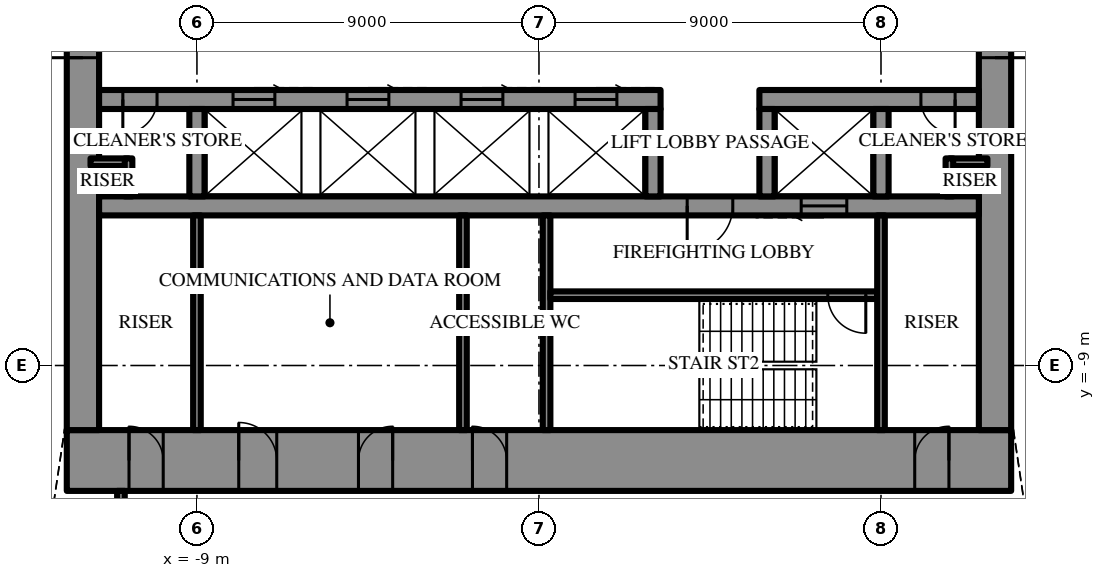
"""IFC4 building model, lengths in metres.
Left out: names, types, materials, properties, quantities, classifications, styles, units other than length and angle.
Written with IfcOpenShell. Run it as: python <this file> out.ifc"""

import sys

from ifc_helpers import new_model, si_unit, direction, frame, frame_2d, origin, place, context, subcontext, project, spatial, rectangle, extrude, element, fill, save


model = new_model("IFC4")
c1 = context("Model", 3, precision=1e-05, world=origin(), true_north=direction((0.0, 1.0)))
c2 = subcontext(c1, "Body", "Model", "MODEL_VIEW")
j1 = project(units=[si_unit("LENGTHUNIT", "METRE"), si_unit("PLANEANGLEUNIT", "RADIAN")], contexts=[c1])
p1 = place(None, origin())
s1 = spatial("IfcSite", under=j1, at=p1, CompositionType="ELEMENT")
p2 = place(p1, origin())
s2 = spatial("IfcBuilding", under=s1, at=p2, CompositionType="ELEMENT")
p3 = place(p2, frame((0.0, 0.0, 324.1)))
s3 = spatial("IfcBuildingStorey", under=s2, at=p3, CompositionType="ELEMENT", Elevation=324.1)
p4 = place(p3, frame((12.425, -11.5, 0.0), z_axis=(0.0, 0.0, 1.0), x_axis=(-1.0, 0.0, 0.0)))
e1 = element("IfcWall", 1, at=p4, inside=s3, PredefinedType="SHEAR", context=c2, shape_type="SweptSolid", body=[
    extrude(rectangle(XDim=24.85, YDim=1.6, at=frame_2d((12.425, 0.0))), origin(), (0.0, 0.0, 1.0), 4.2),
])
p5 = place(p4, frame((13.275, 0.0, 0.0)))
e2 = element("IfcOpeningElement", 2, at=p5, cuts=e1, PredefinedType="OPENING", context=c2, shape_type="SweptSolid", body=[
    extrude(rectangle(XDim=0.9, YDim=2.2, at=frame_2d((0.45, 1.1))), frame((0.0, 0.81, 0.0), z_axis=(0.0, -1.0, 0.0), x_axis=(1.0, 0.0, 0.0)), (0.0, 0.0, 1.0), 1.62),
])
p6 = place(p4, frame((16.275, 0.0, 0.0)))
e3 = element("IfcOpeningElement", 3, at=p6, cuts=e1, PredefinedType="OPENING", context=c2, shape_type="SweptSolid", body=[
    extrude(rectangle(XDim=0.9, YDim=2.2, at=frame_2d((0.45, 1.1))), frame((0.0, 0.81, 0.0), z_axis=(0.0, -1.0, 0.0), x_axis=(1.0, 0.0, 0.0)), (0.0, 0.0, 1.0), 1.62),
])
p7 = place(p4, frame((19.325, 0.0, 0.0)))
e4 = element("IfcOpeningElement", 4, at=p7, cuts=e1, PredefinedType="OPENING", context=c2, shape_type="SweptSolid", body=[
    extrude(rectangle(XDim=1.0, YDim=2.2, at=frame_2d((0.5, 1.1))), frame((0.0, 0.81, 0.0), z_axis=(0.0, -1.0, 0.0), x_axis=(1.0, 0.0, 0.0)), (0.0, 0.0, 1.0), 1.62),
])
p8 = place(p4, frame((1.637, 0.0, 0.0)))
e5 = element("IfcOpeningElement", 5, at=p8, cuts=e1, PredefinedType="OPENING", context=c2, shape_type="SweptSolid", body=[
    extrude(rectangle(XDim=0.9, YDim=2.2, at=frame_2d((0.45, 1.1))), frame((0.0, 0.81, 0.0), z_axis=(0.0, -1.0, 0.0), x_axis=(1.0, 0.0, 0.0)), (0.0, 0.0, 1.0), 1.62),
])
p9 = place(p4, frame((22.312, 0.0, 0.0)))
e6 = element("IfcOpeningElement", 6, at=p9, cuts=e1, PredefinedType="OPENING", context=c2, shape_type="SweptSolid", body=[
    extrude(rectangle(XDim=0.9, YDim=2.2, at=frame_2d((0.45, 1.1))), frame((0.0, 0.81, 0.0), z_axis=(0.0, -1.0, 0.0), x_axis=(1.0, 0.0, 0.0)), (0.0, 0.0, 1.0), 1.62),
])
p10 = place(p3, frame((12.0, -10.7, 0.0), z_axis=(0.0, 0.0, 1.0), x_axis=(0.0, 1.0, 0.0)))
e7 = element("IfcWall", 7, at=p10, inside=s3, PredefinedType="SHEAR", context=c2, shape_type="SweptSolid", body=[
    extrude(rectangle(XDim=21.4, YDim=0.85, at=frame_2d((10.7, 0.0))), origin(), (0.0, 0.0, 1.0), 4.2),
])
p11 = place(p10, frame((9.8, 0.0, 0.0)))
e8 = element("IfcOpeningElement", 8, at=p11, cuts=e7, PredefinedType="OPENING", context=c2, shape_type="SweptSolid", body=[
    extrude(rectangle(XDim=1.8, YDim=2.4, at=frame_2d((0.9, 1.2))), frame((0.0, 0.435, 0.0), z_axis=(0.0, -1.0, 0.0), x_axis=(1.0, 0.0, 0.0)), (0.0, 0.0, 1.0), 0.87),
])
p12 = place(p3, frame((-12.0, 10.7, 0.0), z_axis=(0.0, 0.0, 1.0), x_axis=(0.0, -1.0, 0.0)))
e9 = element("IfcWall", 9, at=p12, inside=s3, PredefinedType="SHEAR", context=c2, shape_type="SweptSolid", body=[
    extrude(rectangle(XDim=21.4, YDim=0.85, at=frame_2d((10.7, 0.0))), origin(), (0.0, 0.0, 1.0), 4.2),
])
p13 = place(p12, frame((9.8, 0.0, 0.0)))
e10 = element("IfcOpeningElement", 10, at=p13, cuts=e9, PredefinedType="OPENING", context=c2, shape_type="SweptSolid", body=[
    extrude(rectangle(XDim=1.8, YDim=2.4, at=frame_2d((0.9, 1.2))), frame((0.0, 0.435, 0.0), z_axis=(0.0, -1.0, 0.0), x_axis=(1.0, 0.0, 0.0)), (0.0, 0.0, 1.0), 0.87),
])
p14 = place(p3, frame((11.575, -2.0, 0.0), z_axis=(0.0, 0.0, 1.0), x_axis=(-1.0, 0.0, 0.0)))
e11 = element("IfcWall", 11, at=p14, inside=s3, PredefinedType="SHEAR", context=c2, shape_type="SweptSolid", body=[
    extrude(rectangle(XDim=5.775, YDim=0.5, at=frame_2d((2.887, 0.0))), origin(), (0.0, 0.0, 1.0), 4.2),
])
p15 = place(p14, frame((0.625, 0.0, 0.0)))
e12 = element("IfcOpeningElement", 12, at=p15, cuts=e11, PredefinedType="OPENING", context=c2, shape_type="SweptSolid", body=[
    extrude(rectangle(XDim=0.9, YDim=2.2, at=frame_2d((0.45, 1.1))), frame((0.0, 0.26, 0.0), z_axis=(0.0, -1.0, 0.0), x_axis=(1.0, 0.0, 0.0)), (0.0, 0.0, 1.0), 0.52),
])
p16 = place(p3, frame((3.2, -2.0, 0.0), z_axis=(0.0, 0.0, 1.0), x_axis=(-1.0, 0.0, 0.0)))
e13 = element("IfcWall", 13, at=p16, inside=s3, PredefinedType="SHEAR", context=c2, shape_type="SweptSolid", body=[
    extrude(rectangle(XDim=14.775, YDim=0.5, at=frame_2d((7.387, 0.0))), origin(), (0.0, 0.0, 1.0), 4.2),
])
p17 = place(p16, frame((13.25, 0.0, 0.0)))
e14 = element("IfcOpeningElement", 14, at=p17, cuts=e13, PredefinedType="OPENING", context=c2, shape_type="SweptSolid", body=[
    extrude(rectangle(XDim=0.9, YDim=2.2, at=frame_2d((0.45, 1.1))), frame((0.0, 0.26, 0.0), z_axis=(0.0, -1.0, 0.0), x_axis=(1.0, 0.0, 0.0)), (0.0, 0.0, 1.0), 0.52),
])
p18 = place(p16, frame((1.15, 0.0, 0.0)))
e15 = element("IfcOpeningElement", 15, at=p18, cuts=e13, PredefinedType="OPENING", context=c2, shape_type="SweptSolid", body=[
    extrude(rectangle(XDim=1.1, YDim=2.2, at=frame_2d((0.55, 1.1))), frame((0.0, 0.26, 0.0), z_axis=(0.0, -1.0, 0.0), x_axis=(1.0, 0.0, 0.0)), (0.0, 0.0, 1.0), 0.52),
])
p19 = place(p16, frame((4.15, 0.0, 0.0)))
e16 = element("IfcOpeningElement", 16, at=p19, cuts=e13, PredefinedType="OPENING", context=c2, shape_type="SweptSolid", body=[
    extrude(rectangle(XDim=1.1, YDim=2.2, at=frame_2d((0.55, 1.1))), frame((0.0, 0.26, 0.0), z_axis=(0.0, -1.0, 0.0), x_axis=(1.0, 0.0, 0.0)), (0.0, 0.0, 1.0), 0.52),
])
p20 = place(p16, frame((7.15, 0.0, 0.0)))
e17 = element("IfcOpeningElement", 17, at=p20, cuts=e13, PredefinedType="OPENING", context=c2, shape_type="SweptSolid", body=[
    extrude(rectangle(XDim=1.1, YDim=2.2, at=frame_2d((0.55, 1.1))), frame((0.0, 0.26, 0.0), z_axis=(0.0, -1.0, 0.0), x_axis=(1.0, 0.0, 0.0)), (0.0, 0.0, 1.0), 0.52),
])
p21 = place(p16, frame((10.15, 0.0, 0.0)))
e18 = element("IfcOpeningElement", 18, at=p21, cuts=e13, PredefinedType="OPENING", context=c2, shape_type="SweptSolid", body=[
    extrude(rectangle(XDim=1.1, YDim=2.2, at=frame_2d((0.55, 1.1))), frame((0.0, 0.26, 0.0), z_axis=(0.0, -1.0, 0.0), x_axis=(1.0, 0.0, 0.0)), (0.0, 0.0, 1.0), 0.52),
])
p22 = place(p3, frame((11.575, -4.8, 0.0), z_axis=(0.0, 0.0, 1.0), x_axis=(-1.0, 0.0, 0.0)))
e19 = element("IfcWall", 19, at=p22, inside=s3, PredefinedType="SHEAR", context=c2, shape_type="SweptSolid", body=[
    extrude(rectangle(XDim=23.15, YDim=0.5, at=frame_2d((11.575, 0.0))), origin(), (0.0, 0.0, 1.0), 4.2),
])
p23 = place(p22, frame((6.475, 0.0, 0.0)))
e20 = element("IfcOpeningElement", 20, at=p23, cuts=e19, PredefinedType="OPENING", context=c2, shape_type="SweptSolid", body=[
    extrude(rectangle(XDim=1.2, YDim=2.2, at=frame_2d((0.6, 1.1))), frame((0.0, 0.26, 0.0), z_axis=(0.0, -1.0, 0.0), x_axis=(1.0, 0.0, 0.0)), (0.0, 0.0, 1.0), 0.52),
])
p24 = place(p22, frame((3.475, 0.0, 0.0)))
e21 = element("IfcOpeningElement", 21, at=p24, cuts=e19, PredefinedType="OPENING", context=c2, shape_type="SweptSolid", body=[
    extrude(rectangle(XDim=1.2, YDim=2.2, at=frame_2d((0.6, 1.1))), frame((0.0, 0.26, 0.0), z_axis=(0.0, -1.0, 0.0), x_axis=(1.0, 0.0, 0.0)), (0.0, 0.0, 1.0), 0.52),
])
for number, where, z_axis, x_axis in (
    (22, (9.0, -2.25, 0.0), (0.0, 0.0, 1.0), (0.0, -1.0, 0.0)),
    (23, (6.0, -2.25, 0.0), (0.0, 0.0, 1.0), (0.0, -1.0, 0.0)),
    (24, (3.0, -2.25, 0.0), (0.0, 0.0, 1.0), (0.0, -1.0, 0.0)),
    (25, (-9.0, -2.25, 0.0), (0.0, 0.0, 1.0), (0.0, -1.0, 0.0)),
):
    element("IfcWall", number, at=place(p3, frame(where, z_axis=z_axis, x_axis=x_axis)), inside=s3, PredefinedType="SHEAR", context=c2, shape_type="SweptSolid", body=[
        extrude(rectangle(XDim=2.3, YDim=0.4, at=frame_2d((1.15, 0.0))), origin(), (0.0, 0.0, 1.0), 4.2),
    ])
p25 = place(p3, frame((0.2, -5.05, 0.0), z_axis=(0.0, 0.0, 1.0), x_axis=(0.0, -1.0, 0.0)))
e26 = element("IfcWall", 26, at=p25, inside=s3, PredefinedType="SHEAR", context=c2, shape_type="SweptSolid", body=[
    extrude(rectangle(XDim=5.65, YDim=0.2, at=frame_2d((2.825, 0.0))), origin(), (0.0, 0.0, 1.0), 4.2),
])
p26 = place(p3, frame((8.9, -7.15, 0.0), z_axis=(0.0, 0.0, 1.0), x_axis=(-1.0, 0.0, 0.0)))
e27 = element("IfcWall", 27, at=p26, inside=s3, PredefinedType="SHEAR", context=c2, shape_type="SweptSolid", body=[
    extrude(rectangle(XDim=8.6, YDim=0.2, at=frame_2d((4.3, 0.0))), origin(), (0.0, 0.0, 1.0), 4.2),
])
p27 = place(p26, frame((0.3, 0.0, 0.0)))
e28 = element("IfcOpeningElement", 28, at=p27, cuts=e27, PredefinedType="OPENING", context=c2, shape_type="SweptSolid", body=[
    extrude(rectangle(XDim=1.0, YDim=2.2, at=frame_2d((0.5, 1.1))), frame((0.0, 0.11, 0.0), z_axis=(0.0, -1.0, 0.0), x_axis=(1.0, 0.0, 0.0)), (0.0, 0.0, 1.0), 0.22),
])
for number, where, z_axis, x_axis in (
    (29, (9.0, -5.05, 0.0), (0.0, 0.0, 1.0), (0.0, -1.0, 0.0)),
    (30, (-9.0, -5.05, 0.0), (0.0, 0.0, 1.0), (0.0, -1.0, 0.0)),
    (31, (-2.0, -5.05, 0.0), (0.0, 0.0, 1.0), (0.0, -1.0, 0.0)),
):
    element("IfcWall", number, at=place(p3, frame(where, z_axis=z_axis, x_axis=x_axis)), inside=s3, PredefinedType="PARTITIONING", context=c2, shape_type="SweptSolid", body=[
        extrude(rectangle(XDim=5.65, YDim=0.2, at=frame_2d((2.825, 0.0))), origin(), (0.0, 0.0, 1.0), 4.0),
    ])
for number, where, z_axis, x_axis in (
    (32, (11.8, -3.65, 0.0), (0.0, 0.0, 1.0), (-1.0, 0.0, 0.0)),
    (33, (10.8, -3.55, 0.0), (0.0, 0.0, 1.0), (0.0, -1.0, 0.0)),
    (34, (-10.8, -3.65, 0.0), (0.0, 0.0, 1.0), (-1.0, 0.0, 0.0)),
    (35, (-10.8, -3.55, 0.0), (0.0, 0.0, 1.0), (0.0, -1.0, 0.0)),
):
    element("IfcWall", number, at=place(p3, frame(where, z_axis=z_axis, x_axis=x_axis)), inside=s3, PredefinedType="PARTITIONING", context=c2, shape_type="SweptSolid", body=[
        extrude(rectangle(XDim=1.0, YDim=0.2, at=frame_2d((0.5, 0.0))), origin(), (0.0, 0.0, 1.0), 4.0),
    ])
p28 = place(p3, frame((-11.0, -12.3, 0.0), z_axis=(0.0, 0.0, 1.0), x_axis=(0.0, -1.0, 0.0)))
e36 = element("IfcWall", 36, at=p28, inside=s3, PredefinedType="PARTITIONING", context=c2, shape_type="SweptSolid", body=[
    extrude(rectangle(XDim=14.25, YDim=0.2, at=frame_2d((7.125, 0.0))), origin(), (0.0, 0.0, 1.0), 4.0),
])
p29 = place(p28, frame((0.925, 0.0, 0.0)))
e37 = element("IfcOpeningElement", 37, at=p29, cuts=e36, PredefinedType="OPENING", context=c2, shape_type="SweptSolid", body=[
    extrude(rectangle(XDim=1.0, YDim=2.2, at=frame_2d((0.5, 1.1))), frame((0.0, 0.11, 0.0), z_axis=(0.0, -1.0, 0.0), x_axis=(1.0, 0.0, 0.0)), (0.0, 0.0, 1.0), 0.22),
])
p30 = place(p11, frame((1.8, 0.0, 0.0), z_axis=(0.0, 0.0, 1.0), x_axis=(-1.0, 0.0, 0.0)))
e38 = element("IfcDoor", 38, at=p30, inside=s3, OperationType="DOUBLE_DOOR_SINGLE_SWING", PredefinedType="DOOR", context=c2, shape_type="SweptSolid", body=[
    extrude(rectangle(XDim=1.8, YDim=2.4, at=frame_2d((0.9, 1.2))), frame((0.0, 0.025, 0.0), z_axis=(0.0, -1.0, 0.0), x_axis=(1.0, 0.0, 0.0)), (0.0, 0.0, 1.0), 0.05),
])
fill(e8, e38)
p31 = place(p13, frame((1.8, 0.0, 0.0), z_axis=(0.0, 0.0, 1.0), x_axis=(-1.0, 0.0, 0.0)))
e39 = element("IfcDoor", 39, at=p31, inside=s3, OperationType="DOUBLE_DOOR_SINGLE_SWING", PredefinedType="DOOR", context=c2, shape_type="SweptSolid", body=[
    extrude(rectangle(XDim=1.8, YDim=2.4, at=frame_2d((0.9, 1.2))), frame((0.0, 0.025, 0.0), z_axis=(0.0, -1.0, 0.0), x_axis=(1.0, 0.0, 0.0)), (0.0, 0.0, 1.0), 0.05),
])
fill(e10, e39)
p32 = place(p23, origin())
e40 = element("IfcDoor", 40, at=p32, inside=s3, OperationType="SINGLE_SWING_LEFT", PredefinedType="DOOR", context=c2, shape_type="SweptSolid", body=[
    extrude(rectangle(XDim=1.2, YDim=2.2, at=frame_2d((0.6, 1.1))), frame((0.0, 0.025, 0.0), z_axis=(0.0, -1.0, 0.0), x_axis=(1.0, 0.0, 0.0)), (0.0, 0.0, 1.0), 0.05),
])
fill(e20, e40)
p33 = place(p27, origin())
e41 = element("IfcDoor", 41, at=p33, inside=s3, OperationType="SINGLE_SWING_RIGHT", PredefinedType="DOOR", context=c2, shape_type="SweptSolid", body=[
    extrude(rectangle(XDim=1.0, YDim=2.2, at=frame_2d((0.5, 1.1))), frame((0.0, 0.025, 0.0), z_axis=(0.0, -1.0, 0.0), x_axis=(1.0, 0.0, 0.0)), (0.0, 0.0, 1.0), 0.05),
])
fill(e28, e41)
p34 = place(p5, frame((0.9, 0.0, 0.0), z_axis=(0.0, 0.0, 1.0), x_axis=(-1.0, 0.0, 0.0)))
e42 = element("IfcDoor", 42, at=p34, inside=s3, OperationType="SINGLE_SWING_RIGHT", PredefinedType="DOOR", context=c2, shape_type="SweptSolid", body=[
    extrude(rectangle(XDim=0.9, YDim=2.2, at=frame_2d((0.45, 1.1))), frame((0.0, 0.025, 0.0), z_axis=(0.0, -1.0, 0.0), x_axis=(1.0, 0.0, 0.0)), (0.0, 0.0, 1.0), 0.05),
])
fill(e2, e42)
p35 = place(p6, frame((0.9, 0.0, 0.0), z_axis=(0.0, 0.0, 1.0), x_axis=(-1.0, 0.0, 0.0)))
e43 = element("IfcDoor", 43, at=p35, inside=s3, OperationType="SINGLE_SWING_LEFT", PredefinedType="DOOR", context=c2, shape_type="SweptSolid", body=[
    extrude(rectangle(XDim=0.9, YDim=2.2, at=frame_2d((0.45, 1.1))), frame((0.0, 0.025, 0.0), z_axis=(0.0, -1.0, 0.0), x_axis=(1.0, 0.0, 0.0)), (0.0, 0.0, 1.0), 0.05),
])
fill(e3, e43)
p36 = place(p7, frame((1.0, 0.0, 0.0), z_axis=(0.0, 0.0, 1.0), x_axis=(-1.0, 0.0, 0.0)))
e44 = element("IfcDoor", 44, at=p36, inside=s3, OperationType="SINGLE_SWING_RIGHT", PredefinedType="DOOR", context=c2, shape_type="SweptSolid", body=[
    extrude(rectangle(XDim=1.0, YDim=2.2, at=frame_2d((0.5, 1.1))), frame((0.0, 0.025, 0.0), z_axis=(0.0, -1.0, 0.0), x_axis=(1.0, 0.0, 0.0)), (0.0, 0.0, 1.0), 0.05),
])
fill(e4, e44)
p37 = place(p8, frame((0.9, 0.0, 0.0), z_axis=(0.0, 0.0, 1.0), x_axis=(-1.0, 0.0, 0.0)))
e45 = element("IfcDoor", 45, at=p37, inside=s3, OperationType="SINGLE_SWING_LEFT", PredefinedType="DOOR", context=c2, shape_type="SweptSolid", body=[
    extrude(rectangle(XDim=0.9, YDim=2.2, at=frame_2d((0.45, 1.1))), frame((0.0, 0.025, 0.0), z_axis=(0.0, -1.0, 0.0), x_axis=(1.0, 0.0, 0.0)), (0.0, 0.0, 1.0), 0.05),
])
fill(e5, e45)
p38 = place(p9, frame((0.9, 0.0, 0.0), z_axis=(0.0, 0.0, 1.0), x_axis=(-1.0, 0.0, 0.0)))
e46 = element("IfcDoor", 46, at=p38, inside=s3, OperationType="SINGLE_SWING_RIGHT", PredefinedType="DOOR", context=c2, shape_type="SweptSolid", body=[
    extrude(rectangle(XDim=0.9, YDim=2.2, at=frame_2d((0.45, 1.1))), frame((0.0, 0.025, 0.0), z_axis=(0.0, -1.0, 0.0), x_axis=(1.0, 0.0, 0.0)), (0.0, 0.0, 1.0), 0.05),
])
fill(e6, e46)
p39 = place(p15, origin())
e47 = element("IfcDoor", 47, at=p39, inside=s3, OperationType="SINGLE_SWING_RIGHT", PredefinedType="DOOR", context=c2, shape_type="SweptSolid", body=[
    extrude(rectangle(XDim=0.9, YDim=2.2, at=frame_2d((0.45, 1.1))), frame((0.0, 0.025, 0.0), z_axis=(0.0, -1.0, 0.0), x_axis=(1.0, 0.0, 0.0)), (0.0, 0.0, 1.0), 0.05),
])
fill(e12, e47)
p40 = place(p17, origin())
e48 = element("IfcDoor", 48, at=p40, inside=s3, OperationType="SINGLE_SWING_LEFT", PredefinedType="DOOR", context=c2, shape_type="SweptSolid", body=[
    extrude(rectangle(XDim=0.9, YDim=2.2, at=frame_2d((0.45, 1.1))), frame((0.0, 0.025, 0.0), z_axis=(0.0, -1.0, 0.0), x_axis=(1.0, 0.0, 0.0)), (0.0, 0.0, 1.0), 0.05),
])
fill(e14, e48)
p41 = place(p24, origin())
e49 = element("IfcDoor", 49, at=p41, inside=s3, OperationType="SLIDING_TO_LEFT", PredefinedType="DOOR", context=c2, shape_type="SweptSolid", body=[
    extrude(rectangle(XDim=1.2, YDim=2.2, at=frame_2d((0.6, 1.1))), frame((0.0, 0.025, 0.0), z_axis=(0.0, -1.0, 0.0), x_axis=(1.0, 0.0, 0.0)), (0.0, 0.0, 1.0), 0.05),
])
fill(e21, e49)
p42 = place(p18, frame((1.1, 0.0, 0.0), z_axis=(0.0, 0.0, 1.0), x_axis=(-1.0, 0.0, 0.0)))
e50 = element("IfcDoor", 50, at=p42, inside=s3, OperationType="SLIDING_TO_LEFT", PredefinedType="DOOR", context=c2, shape_type="SweptSolid", body=[
    extrude(rectangle(XDim=1.1, YDim=2.2, at=frame_2d((0.55, 1.1))), frame((0.0, 0.025, 0.0), z_axis=(0.0, -1.0, 0.0), x_axis=(1.0, 0.0, 0.0)), (0.0, 0.0, 1.0), 0.05),
])
fill(e15, e50)
p43 = place(p19, frame((1.1, 0.0, 0.0), z_axis=(0.0, 0.0, 1.0), x_axis=(-1.0, 0.0, 0.0)))
e51 = element("IfcDoor", 51, at=p43, inside=s3, OperationType="SLIDING_TO_LEFT", PredefinedType="DOOR", context=c2, shape_type="SweptSolid", body=[
    extrude(rectangle(XDim=1.1, YDim=2.2, at=frame_2d((0.55, 1.1))), frame((0.0, 0.025, 0.0), z_axis=(0.0, -1.0, 0.0), x_axis=(1.0, 0.0, 0.0)), (0.0, 0.0, 1.0), 0.05),
])
fill(e16, e51)
p44 = place(p20, frame((1.1, 0.0, 0.0), z_axis=(0.0, 0.0, 1.0), x_axis=(-1.0, 0.0, 0.0)))
e52 = element("IfcDoor", 52, at=p44, inside=s3, OperationType="SLIDING_TO_LEFT", PredefinedType="DOOR", context=c2, shape_type="SweptSolid", body=[
    extrude(rectangle(XDim=1.1, YDim=2.2, at=frame_2d((0.55, 1.1))), frame((0.0, 0.025, 0.0), z_axis=(0.0, -1.0, 0.0), x_axis=(1.0, 0.0, 0.0)), (0.0, 0.0, 1.0), 0.05),
])
fill(e17, e52)
p45 = place(p21, frame((1.1, 0.0, 0.0), z_axis=(0.0, 0.0, 1.0), x_axis=(-1.0, 0.0, 0.0)))
e53 = element("IfcDoor", 53, at=p45, inside=s3, OperationType="SLIDING_TO_LEFT", PredefinedType="DOOR", context=c2, shape_type="SweptSolid", body=[
    extrude(rectangle(XDim=1.1, YDim=2.2, at=frame_2d((0.55, 1.1))), frame((0.0, 0.025, 0.0), z_axis=(0.0, -1.0, 0.0), x_axis=(1.0, 0.0, 0.0)), (0.0, 0.0, 1.0), 0.05),
])
fill(e18, e53)
save(model, sys.argv[1])
